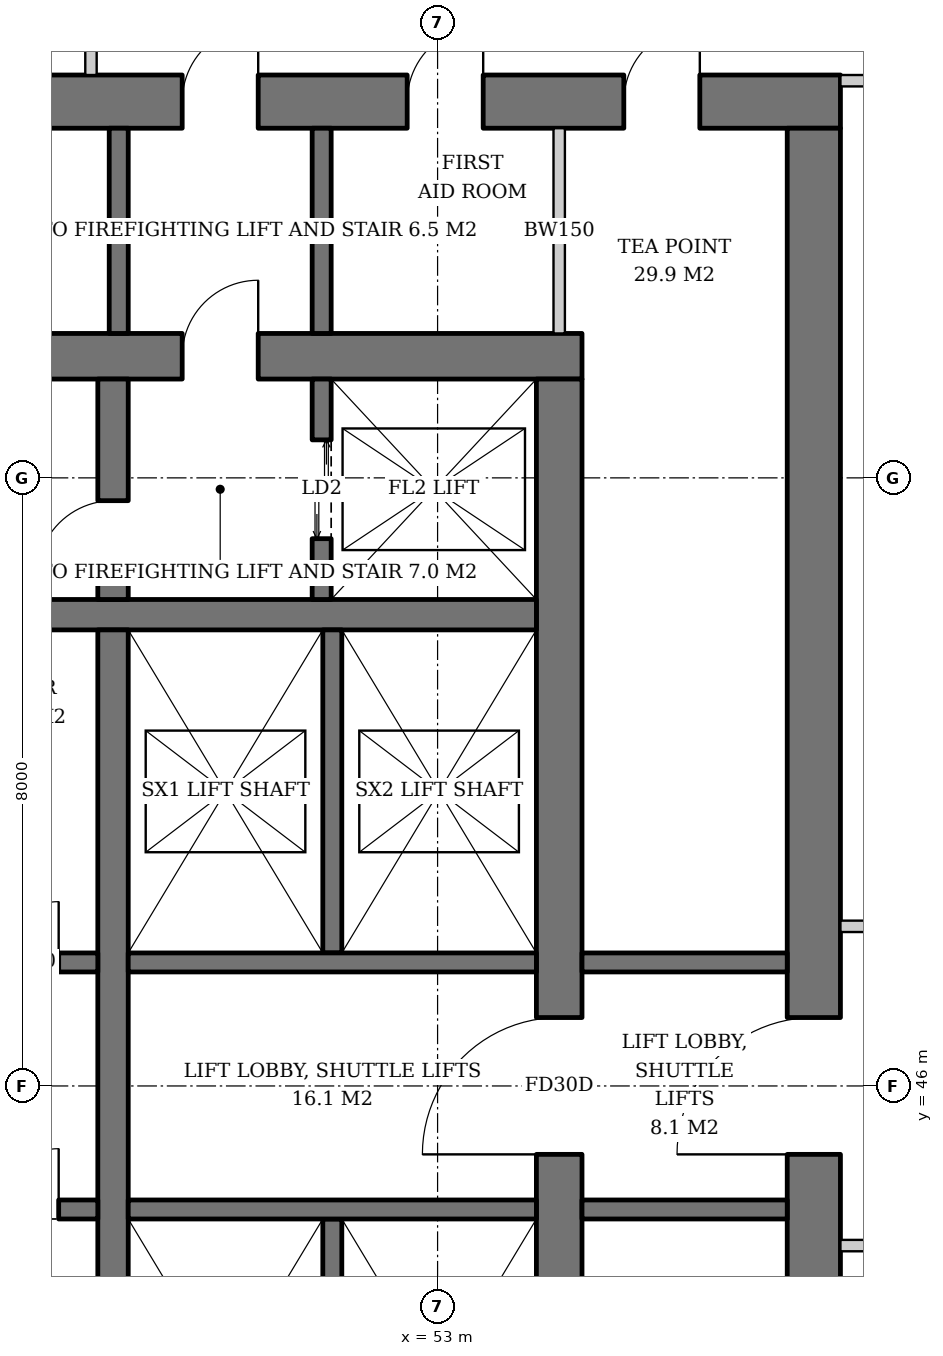
"""IFC4 building model, lengths in metres.
Left out: names, types, materials, properties, quantities, classifications, styles, units other than length and angle.
Written with IfcOpenShell. Run it as: python <this file> out.ifc"""

import sys

from ifc_helpers import new_model, si_unit, direction, frame, frame_2d, origin, place, context, subcontext, project, spatial, rectangle, extrude, element, fill, save


model = new_model("IFC4")
c1 = context("Model", 3, precision=1e-05, world=origin(), true_north=direction((0.0, 1.0)))
c2 = subcontext(c1, "Body", "Model", "MODEL_VIEW")
j1 = project(units=[si_unit("LENGTHUNIT", "METRE"), si_unit("PLANEANGLEUNIT", "RADIAN")], contexts=[c1])
p1 = place(None, origin())
s1 = spatial("IfcSite", under=j1, at=p1, CompositionType="ELEMENT")
p2 = place(p1, origin())
s2 = spatial("IfcBuilding", under=s1, at=p2, CompositionType="ELEMENT")
p3 = place(p2, frame((0.0, 0.0, 100.8)))
s3 = spatial("IfcBuildingStorey", under=s2, at=p3, CompositionType="ELEMENT", Elevation=100.8)
p4 = place(p3, frame((35.1, 55.6, 0.0), z_axis=(0.0, 0.0, 1.0), x_axis=(1.0, 0.0, 0.0)))
e1 = element("IfcWall", 1, at=p4, inside=s3, PredefinedType="SHEAR", context=c2, shape_type="SweptSolid", body=[
    extrude(rectangle(XDim=19.8, YDim=0.6, at=frame_2d((9.9, 0.0))), origin(), (0.0, 0.0, 1.0), 3.8),
])
p5 = place(p4, frame((14.54, 0.0, 0.0)))
e2 = element("IfcOpeningElement", 2, at=p5, cuts=e1, PredefinedType="OPENING", context=c2, shape_type="SweptSolid", body=[
    extrude(rectangle(XDim=1.0, YDim=2.1, at=frame_2d((0.5, 1.05))), frame((0.0, 0.31, 0.0), z_axis=(0.0, -1.0, 0.0), x_axis=(1.0, 0.0, 0.0)), (0.0, 0.0, 1.0), 0.62),
])
p6 = place(p4, frame((2.425, 0.0, 0.0)))
e3 = element("IfcOpeningElement", 3, at=p6, cuts=e1, PredefinedType="OPENING", context=c2, shape_type="SweptSolid", body=[
    extrude(rectangle(XDim=1.0, YDim=2.1, at=frame_2d((0.5, 1.05))), frame((0.0, 0.31, 0.0), z_axis=(0.0, -1.0, 0.0), x_axis=(1.0, 0.0, 0.0)), (0.0, 0.0, 1.0), 0.62),
])
p7 = place(p3, frame((54.6, 36.7, 0.0), z_axis=(0.0, 0.0, 1.0), x_axis=(0.0, 1.0, 0.0)))
e4 = element("IfcWall", 4, at=p7, inside=s3, PredefinedType="SHEAR", context=c2, shape_type="SweptSolid", body=[
    extrude(rectangle(XDim=18.6, YDim=0.6, at=frame_2d((9.3, 0.0))), origin(), (0.0, 0.0, 1.0), 3.8),
])
p8 = place(p7, frame((8.4, 0.0, 0.0)))
e5 = element("IfcOpeningElement", 5, at=p8, cuts=e4, PredefinedType="OPENING", context=c2, shape_type="SweptSolid", body=[
    extrude(rectangle(XDim=1.8, YDim=2.4, at=frame_2d((0.9, 1.2))), frame((0.0, 0.31, 0.0), z_axis=(0.0, -1.0, 0.0), x_axis=(1.0, 0.0, 0.0)), (0.0, 0.0, 1.0), 0.62),
])
p9 = place(p3, frame((31.7, 58.95, 0.0), z_axis=(0.0, 0.0, 1.0), x_axis=(1.0, 0.0, 0.0)))
e6 = element("IfcWall", 6, at=p9, inside=s3, PredefinedType="SHEAR", context=c2, shape_type="SweptSolid", body=[
    extrude(rectangle(XDim=26.6, YDim=0.7, at=frame_2d((13.3, 0.0))), origin(), (0.0, 0.0, 1.0), 3.8),
])
p10 = place(p9, frame((17.94, 0.0, 0.0)))
e7 = element("IfcOpeningElement", 7, at=p10, cuts=e6, PredefinedType="OPENING", context=c2, shape_type="SweptSolid", body=[
    extrude(rectangle(XDim=1.0, YDim=2.1, at=frame_2d((0.5, 1.05))), frame((0.0, 0.36, 0.0), z_axis=(0.0, -1.0, 0.0), x_axis=(1.0, 0.0, 0.0)), (0.0, 0.0, 1.0), 0.72),
])
p11 = place(p9, frame((5.825, 0.0, 0.0)))
e8 = element("IfcOpeningElement", 8, at=p11, cuts=e6, PredefinedType="OPENING", context=c2, shape_type="SweptSolid", body=[
    extrude(rectangle(XDim=1.0, YDim=2.1, at=frame_2d((0.5, 1.05))), frame((0.0, 0.36, 0.0), z_axis=(0.0, -1.0, 0.0), x_axis=(1.0, 0.0, 0.0)), (0.0, 0.0, 1.0), 0.72),
])
p12 = place(p9, frame((1.169, 0.0, 0.0)))
e9 = element("IfcOpeningElement", 9, at=p12, cuts=e6, PredefinedType="OPENING", context=c2, shape_type="SweptSolid", body=[
    extrude(rectangle(XDim=1.0, YDim=2.1, at=frame_2d((0.5, 1.05))), frame((0.0, 0.36, 0.0), z_axis=(0.0, -1.0, 0.0), x_axis=(1.0, 0.0, 0.0)), (0.0, 0.0, 1.0), 0.72),
])
p13 = place(p9, frame((3.447, 0.0, 0.0)))
e10 = element("IfcOpeningElement", 10, at=p13, cuts=e6, PredefinedType="OPENING", context=c2, shape_type="SweptSolid", body=[
    extrude(rectangle(XDim=1.0, YDim=2.1, at=frame_2d((0.5, 1.05))), frame((0.0, 0.36, 0.0), z_axis=(0.0, -1.0, 0.0), x_axis=(1.0, 0.0, 0.0)), (0.0, 0.0, 1.0), 0.72),
])
p14 = place(p9, frame((11.577, 0.0, 0.0)))
e11 = element("IfcOpeningElement", 11, at=p14, cuts=e6, PredefinedType="OPENING", context=c2, shape_type="SweptSolid", body=[
    extrude(rectangle(XDim=1.0, YDim=2.1, at=frame_2d((0.5, 1.05))), frame((0.0, 0.36, 0.0), z_axis=(0.0, -1.0, 0.0), x_axis=(1.0, 0.0, 0.0)), (0.0, 0.0, 1.0), 0.72),
])
p15 = place(p9, frame((20.9, 0.0, 0.0)))
e12 = element("IfcOpeningElement", 12, at=p15, cuts=e6, PredefinedType="OPENING", context=c2, shape_type="SweptSolid", body=[
    extrude(rectangle(XDim=1.0, YDim=2.1, at=frame_2d((0.5, 1.05))), frame((0.0, 0.36, 0.0), z_axis=(0.0, -1.0, 0.0), x_axis=(1.0, 0.0, 0.0)), (0.0, 0.0, 1.0), 0.72),
])
p16 = place(p9, frame((23.75, 0.0, 0.0)))
e13 = element("IfcOpeningElement", 13, at=p16, cuts=e6, PredefinedType="OPENING", context=c2, shape_type="SweptSolid", body=[
    extrude(rectangle(XDim=1.0, YDim=2.1, at=frame_2d((0.5, 1.05))), frame((0.0, 0.36, 0.0), z_axis=(0.0, -1.0, 0.0), x_axis=(1.0, 0.0, 0.0)), (0.0, 0.0, 1.0), 0.72),
])
p17 = place(p3, frame((57.95, 33.4, 0.0), z_axis=(0.0, 0.0, 1.0), x_axis=(0.0, 1.0, 0.0)))
e14 = element("IfcWall", 14, at=p17, inside=s3, PredefinedType="SHEAR", context=c2, shape_type="SweptSolid", body=[
    extrude(rectangle(XDim=25.2, YDim=0.7, at=frame_2d((12.6, 0.0))), origin(), (0.0, 0.0, 1.0), 3.8),
])
p18 = place(p17, frame((11.7, 0.0, 0.0)))
e15 = element("IfcOpeningElement", 15, at=p18, cuts=e14, PredefinedType="OPENING", context=c2, shape_type="SweptSolid", body=[
    extrude(rectangle(XDim=1.8, YDim=2.4, at=frame_2d((0.9, 1.2))), frame((0.0, 0.36, 0.0), z_axis=(0.0, -1.0, 0.0), x_axis=(1.0, 0.0, 0.0)), (0.0, 0.0, 1.0), 0.72),
])
p19 = place(p3, frame((35.7, 52.2, 0.0), z_axis=(0.0, 0.0, 1.0), x_axis=(1.0, 0.0, 0.0)))
e16 = element("IfcWall", 16, at=p19, inside=s3, PredefinedType="SHEAR", context=c2, shape_type="SweptSolid", body=[
    extrude(rectangle(XDim=18.6, YDim=0.4, at=frame_2d((9.3, 0.0))), origin(), (0.0, 0.0, 1.0), 3.8),
])
p20 = place(p3, frame((48.73, 40.0, 0.0), z_axis=(0.0, 0.0, 1.0), x_axis=(0.0, 1.0, 0.0)))
e17 = element("IfcWall", 17, at=p20, inside=s3, PredefinedType="SHEAR", context=c2, shape_type="SweptSolid", body=[
    extrude(rectangle(XDim=12.0, YDim=0.4, at=frame_2d((6.0, 0.0))), origin(), (0.0, 0.0, 1.0), 3.8),
])
p21 = place(p3, frame((48.73, 52.4, 0.0), z_axis=(0.0, 0.0, 1.0), x_axis=(0.0, 1.0, 0.0)))
e18 = element("IfcWall", 18, at=p21, inside=s3, PredefinedType="SHEAR", context=c2, shape_type="SweptSolid", body=[
    extrude(rectangle(XDim=2.9, YDim=0.4, at=frame_2d((1.45, 0.0))), origin(), (0.0, 0.0, 1.0), 3.8),
])
p22 = place(p21, frame((0.3, 0.0, 0.0)))
e19 = element("IfcOpeningElement", 19, at=p22, cuts=e18, PredefinedType="OPENING", context=c2, shape_type="SweptSolid", body=[
    extrude(rectangle(XDim=1.0, YDim=2.1, at=frame_2d((0.5, 1.05))), frame((0.0, 0.21, 0.0), z_axis=(0.0, -1.0, 0.0), x_axis=(1.0, 0.0, 0.0)), (0.0, 0.0, 1.0), 0.42),
])
p23 = place(p3, frame((51.475, 52.4, 0.0), z_axis=(0.0, 0.0, 1.0), x_axis=(0.0, 1.0, 0.0)))
e20 = element("IfcWall", 20, at=p23, inside=s3, PredefinedType="SHEAR", context=c2, shape_type="SweptSolid", body=[
    extrude(rectangle(XDim=2.9, YDim=0.25, at=frame_2d((1.45, 0.0))), origin(), (0.0, 0.0, 1.0), 3.8),
])
p24 = place(p23, frame((0.8, 0.0, 0.0)))
e21 = element("IfcOpeningElement", 21, at=p24, cuts=e20, PredefinedType="OPENING", context=c2, shape_type="SweptSolid", body=[
    extrude(rectangle(XDim=1.3, YDim=2.2, at=frame_2d((0.65, 1.1))), frame((0.0, 0.135, 0.0), z_axis=(0.0, -1.0, 0.0), x_axis=(1.0, 0.0, 0.0)), (0.0, 0.0, 1.0), 0.27),
])
p25 = place(p3, frame((35.7, 47.625, 0.0), z_axis=(0.0, 0.0, 1.0), x_axis=(1.0, 0.0, 0.0)))
e22 = element("IfcWall", 22, at=p25, inside=s3, PredefinedType="SHEAR", context=c2, shape_type="SweptSolid", body=[
    extrude(rectangle(XDim=12.83, YDim=0.25, at=frame_2d((6.415, 0.0))), origin(), (0.0, 0.0, 1.0), 3.8),
])
p26 = place(p25, frame((0.7, 0.0, 0.0)))
e23 = element("IfcOpeningElement", 23, at=p26, cuts=e22, PredefinedType="OPENING", context=c2, shape_type="SweptSolid", body=[
    extrude(rectangle(XDim=1.1, YDim=2.2, at=frame_2d((0.55, 1.1))), frame((0.0, 0.135, 0.0), z_axis=(0.0, -1.0, 0.0), x_axis=(1.0, 0.0, 0.0)), (0.0, 0.0, 1.0), 0.27),
])
p27 = place(p25, frame((3.45, 0.0, 0.0)))
e24 = element("IfcOpeningElement", 24, at=p27, cuts=e22, PredefinedType="OPENING", context=c2, shape_type="SweptSolid", body=[
    extrude(rectangle(XDim=1.1, YDim=2.2, at=frame_2d((0.55, 1.1))), frame((0.0, 0.135, 0.0), z_axis=(0.0, -1.0, 0.0), x_axis=(1.0, 0.0, 0.0)), (0.0, 0.0, 1.0), 0.27),
])
p28 = place(p25, frame((6.2, 0.0, 0.0)))
e25 = element("IfcOpeningElement", 25, at=p28, cuts=e22, PredefinedType="OPENING", context=c2, shape_type="SweptSolid", body=[
    extrude(rectangle(XDim=1.1, YDim=2.2, at=frame_2d((0.55, 1.1))), frame((0.0, 0.135, 0.0), z_axis=(0.0, -1.0, 0.0), x_axis=(1.0, 0.0, 0.0)), (0.0, 0.0, 1.0), 0.27),
])
p29 = place(p25, frame((8.95, 0.0, 0.0)))
e26 = element("IfcOpeningElement", 26, at=p29, cuts=e22, PredefinedType="OPENING", context=c2, shape_type="SweptSolid", body=[
    extrude(rectangle(XDim=1.1, YDim=2.2, at=frame_2d((0.55, 1.1))), frame((0.0, 0.135, 0.0), z_axis=(0.0, -1.0, 0.0), x_axis=(1.0, 0.0, 0.0)), (0.0, 0.0, 1.0), 0.27),
])
p30 = place(p25, frame((11.515, 0.0, 0.0)))
e27 = element("IfcOpeningElement", 27, at=p30, cuts=e22, PredefinedType="OPENING", context=c2, shape_type="SweptSolid", body=[
    extrude(rectangle(XDim=0.8, YDim=2.0, at=frame_2d((0.4, 1.0))), frame((0.0, 0.135, 0.0), z_axis=(0.0, -1.0, 0.0), x_axis=(1.0, 0.0, 0.0)), (0.0, 0.0, 1.0), 0.27),
])
p31 = place(p3, frame((35.7, 44.375, 0.0), z_axis=(0.0, 0.0, 1.0), x_axis=(1.0, 0.0, 0.0)))
e28 = element("IfcWall", 28, at=p31, inside=s3, PredefinedType="SHEAR", context=c2, shape_type="SweptSolid", body=[
    extrude(rectangle(XDim=12.83, YDim=0.25, at=frame_2d((6.415, 0.0))), origin(), (0.0, 0.0, 1.0), 3.8),
])
p32 = place(p31, frame((0.7, 0.0, 0.0)))
e29 = element("IfcOpeningElement", 29, at=p32, cuts=e28, PredefinedType="OPENING", context=c2, shape_type="SweptSolid", body=[
    extrude(rectangle(XDim=1.1, YDim=2.2, at=frame_2d((0.55, 1.1))), frame((0.0, 0.135, 0.0), z_axis=(0.0, -1.0, 0.0), x_axis=(1.0, 0.0, 0.0)), (0.0, 0.0, 1.0), 0.27),
])
p33 = place(p31, frame((3.45, 0.0, 0.0)))
e30 = element("IfcOpeningElement", 30, at=p33, cuts=e28, PredefinedType="OPENING", context=c2, shape_type="SweptSolid", body=[
    extrude(rectangle(XDim=1.1, YDim=2.2, at=frame_2d((0.55, 1.1))), frame((0.0, 0.135, 0.0), z_axis=(0.0, -1.0, 0.0), x_axis=(1.0, 0.0, 0.0)), (0.0, 0.0, 1.0), 0.27),
])
p34 = place(p31, frame((6.2, 0.0, 0.0)))
e31 = element("IfcOpeningElement", 31, at=p34, cuts=e28, PredefinedType="OPENING", context=c2, shape_type="SweptSolid", body=[
    extrude(rectangle(XDim=1.1, YDim=2.2, at=frame_2d((0.55, 1.1))), frame((0.0, 0.135, 0.0), z_axis=(0.0, -1.0, 0.0), x_axis=(1.0, 0.0, 0.0)), (0.0, 0.0, 1.0), 0.27),
])
p35 = place(p31, frame((8.95, 0.0, 0.0)))
e32 = element("IfcOpeningElement", 32, at=p35, cuts=e28, PredefinedType="OPENING", context=c2, shape_type="SweptSolid", body=[
    extrude(rectangle(XDim=1.1, YDim=2.2, at=frame_2d((0.55, 1.1))), frame((0.0, 0.135, 0.0), z_axis=(0.0, -1.0, 0.0), x_axis=(1.0, 0.0, 0.0)), (0.0, 0.0, 1.0), 0.27),
])
p36 = place(p31, frame((11.515, 0.0, 0.0)))
e33 = element("IfcOpeningElement", 33, at=p36, cuts=e28, PredefinedType="OPENING", context=c2, shape_type="SweptSolid", body=[
    extrude(rectangle(XDim=0.8, YDim=2.0, at=frame_2d((0.4, 1.0))), frame((0.0, 0.135, 0.0), z_axis=(0.0, -1.0, 0.0), x_axis=(1.0, 0.0, 0.0)), (0.0, 0.0, 1.0), 0.27),
])
p37 = place(p3, frame((51.615, 47.75, 0.0), z_axis=(0.0, 0.0, 1.0), x_axis=(0.0, 1.0, 0.0)))
e34 = element("IfcWall", 34, at=p37, inside=s3, PredefinedType="SHEAR", context=c2, shape_type="SweptSolid", body=[
    extrude(rectangle(XDim=4.25, YDim=0.25, at=frame_2d((2.125, 0.0))), origin(), (0.0, 0.0, 1.0), 3.8),
])
p38 = place(p3, frame((48.93, 47.625, 0.0), z_axis=(0.0, 0.0, 1.0), x_axis=(1.0, 0.0, 0.0)))
e35 = element("IfcWall", 35, at=p38, inside=s3, PredefinedType="SHEAR", context=c2, shape_type="SweptSolid", body=[
    extrude(rectangle(XDim=5.37, YDim=0.25, at=frame_2d((2.685, 0.0))), origin(), (0.0, 0.0, 1.0), 3.8),
])
p39 = place(p3, frame((51.615, 44.25, 0.0), z_axis=(0.0, 0.0, 1.0), x_axis=(0.0, -1.0, 0.0)))
e36 = element("IfcWall", 36, at=p39, inside=s3, PredefinedType="SHEAR", context=c2, shape_type="SweptSolid", body=[
    extrude(rectangle(XDim=4.25, YDim=0.25, at=frame_2d((2.125, 0.0))), origin(), (0.0, 0.0, 1.0), 3.8),
])
p40 = place(p3, frame((48.93, 44.375, 0.0), z_axis=(0.0, 0.0, 1.0), x_axis=(1.0, 0.0, 0.0)))
e37 = element("IfcWall", 37, at=p40, inside=s3, PredefinedType="SHEAR", context=c2, shape_type="SweptSolid", body=[
    extrude(rectangle(XDim=5.37, YDim=0.25, at=frame_2d((2.685, 0.0))), origin(), (0.0, 0.0, 1.0), 3.8),
])
for number, where, z_axis, x_axis in (
    (38, (48.805, 55.9, 0.0), (0.0, 0.0, 1.0), (0.0, 1.0, 0.0)),
    (39, (51.475, 55.9, 0.0), (0.0, 0.0, 1.0), (0.0, 1.0, 0.0)),
    (40, (54.9, 44.375, 0.0), (0.0, 0.0, 1.0), (1.0, 0.0, 0.0)),
    (41, (54.9, 47.625, 0.0), (0.0, 0.0, 1.0), (1.0, 0.0, 0.0)),
):
    element("IfcWall", number, at=place(p3, frame(where, z_axis=z_axis, x_axis=x_axis)), inside=s3, PredefinedType="SOLIDWALL", context=c2, shape_type="SweptSolid", body=[
        extrude(rectangle(XDim=2.7, YDim=0.25, at=frame_2d((1.35, 0.0))), origin(), (0.0, 0.0, 1.0), 3.62),
    ])
p41 = place(p3, frame((54.6, 55.9, 0.0), z_axis=(0.0, 0.0, 1.0), x_axis=(0.0, 1.0, 0.0)))
e42 = element("IfcWall", 42, at=p41, inside=s3, PredefinedType="SOLIDWALL", context=c2, shape_type="SweptSolid", body=[
    extrude(rectangle(XDim=2.7, YDim=0.15, at=frame_2d((1.35, 0.0))), origin(), (0.0, 0.0, 1.0), 3.62),
])
for number, where, z_axis, x_axis in (
    (43, (58.3, 43.9, 0.0), (0.0, 0.0, 1.0), (1.0, 0.0, 0.0)),
    (44, (58.3, 48.1, 0.0), (0.0, 0.0, 1.0), (1.0, 0.0, 0.0)),
    (45, (58.3, 59.225, 0.0), (0.0, 0.0, 1.0), (1.0, 0.0, 0.0)),
    (46, (48.44, 59.3, 0.0), (0.0, 0.0, 1.0), (0.0, 1.0, 0.0)),
):
    element("IfcWall", number, at=place(p3, frame(where, z_axis=z_axis, x_axis=x_axis)), inside=s3, PredefinedType="PARTITIONING", context=c2, shape_type="SweptSolid", body=[
        extrude(rectangle(XDim=2.925, YDim=0.15, at=frame_2d((1.462, 0.0))), origin(), (0.0, 0.0, 1.0), 3.62),
    ])
p42 = place(p24, origin())
e47 = element("IfcDoor", 47, at=p42, inside=s3, OperationType="DOUBLE_DOOR_SLIDING", PredefinedType="DOOR", context=c2, shape_type="SweptSolid", body=[
    extrude(rectangle(XDim=1.3, YDim=2.2, at=frame_2d((0.65, 1.1))), frame((0.0, 0.025, 0.0), z_axis=(0.0, -1.0, 0.0), x_axis=(1.0, 0.0, 0.0)), (0.0, 0.0, 1.0), 0.05),
])
fill(e21, e47)
p43 = place(p30, origin())
e48 = element("IfcDoor", 48, at=p43, inside=s3, OperationType="SINGLE_SWING_RIGHT", PredefinedType="DOOR", context=c2, shape_type="SweptSolid", body=[
    extrude(rectangle(XDim=0.8, YDim=2.0, at=frame_2d((0.4, 1.0))), frame((0.0, 0.025, 0.0), z_axis=(0.0, -1.0, 0.0), x_axis=(1.0, 0.0, 0.0)), (0.0, 0.0, 1.0), 0.05),
])
fill(e27, e48)
p44 = place(p36, origin())
e49 = element("IfcDoor", 49, at=p44, inside=s3, OperationType="SINGLE_SWING_RIGHT", PredefinedType="DOOR", context=c2, shape_type="SweptSolid", body=[
    extrude(rectangle(XDim=0.8, YDim=2.0, at=frame_2d((0.4, 1.0))), frame((0.0, 0.025, 0.0), z_axis=(0.0, -1.0, 0.0), x_axis=(1.0, 0.0, 0.0)), (0.0, 0.0, 1.0), 0.05),
])
fill(e33, e49)
p45 = place(p22, origin())
e50 = element("IfcDoor", 50, at=p45, inside=s3, OperationType="SINGLE_SWING_LEFT", PredefinedType="DOOR", context=c2, shape_type="SweptSolid", body=[
    extrude(rectangle(XDim=1.0, YDim=2.1, at=frame_2d((0.5, 1.05))), frame((0.0, 0.025, 0.0), z_axis=(0.0, -1.0, 0.0), x_axis=(1.0, 0.0, 0.0)), (0.0, 0.0, 1.0), 0.05),
])
fill(e19, e50)
p46 = place(p5, origin())
e51 = element("IfcDoor", 51, at=p46, inside=s3, OperationType="SINGLE_SWING_RIGHT", PredefinedType="DOOR", context=c2, shape_type="SweptSolid", body=[
    extrude(rectangle(XDim=1.0, YDim=2.1, at=frame_2d((0.5, 1.05))), frame((0.0, 0.025, 0.0), z_axis=(0.0, -1.0, 0.0), x_axis=(1.0, 0.0, 0.0)), (0.0, 0.0, 1.0), 0.05),
])
fill(e2, e51)
p47 = place(p8, origin())
e52 = element("IfcDoor", 52, at=p47, inside=s3, OperationType="DOUBLE_DOOR_SINGLE_SWING", PredefinedType="DOOR", context=c2, shape_type="SweptSolid", body=[
    extrude(rectangle(XDim=1.8, YDim=2.4, at=frame_2d((0.9, 1.2))), frame((0.0, 0.025, 0.0), z_axis=(0.0, -1.0, 0.0), x_axis=(1.0, 0.0, 0.0)), (0.0, 0.0, 1.0), 0.05),
])
fill(e5, e52)
p48 = place(p18, origin())
e53 = element("IfcDoor", 53, at=p48, inside=s3, OperationType="DOUBLE_DOOR_SINGLE_SWING", PredefinedType="DOOR", context=c2, shape_type="SweptSolid", body=[
    extrude(rectangle(XDim=1.8, YDim=2.4, at=frame_2d((0.9, 1.2))), frame((0.0, 0.025, 0.0), z_axis=(0.0, -1.0, 0.0), x_axis=(1.0, 0.0, 0.0)), (0.0, 0.0, 1.0), 0.05),
])
fill(e15, e53)
p49 = place(p10, origin())
e54 = element("IfcDoor", 54, at=p49, inside=s3, OperationType="SINGLE_SWING_RIGHT", PredefinedType="DOOR", context=c2, shape_type="SweptSolid", body=[
    extrude(rectangle(XDim=1.0, YDim=2.1, at=frame_2d((0.5, 1.05))), frame((0.0, 0.025, 0.0), z_axis=(0.0, -1.0, 0.0), x_axis=(1.0, 0.0, 0.0)), (0.0, 0.0, 1.0), 0.05),
])
fill(e7, e54)
p50 = place(p15, origin())
e55 = element("IfcDoor", 55, at=p50, inside=s3, OperationType="SINGLE_SWING_RIGHT", PredefinedType="DOOR", context=c2, shape_type="SweptSolid", body=[
    extrude(rectangle(XDim=1.0, YDim=2.1, at=frame_2d((0.5, 1.05))), frame((0.0, -0.29, 0.0), z_axis=(0.0, -1.0, 0.0), x_axis=(1.0, 0.0, 0.0)), (0.0, 0.0, 1.0), 0.05),
])
fill(e12, e55)
p51 = place(p16, origin())
e56 = element("IfcDoor", 56, at=p51, inside=s3, OperationType="SINGLE_SWING_RIGHT", PredefinedType="DOOR", context=c2, shape_type="SweptSolid", body=[
    extrude(rectangle(XDim=1.0, YDim=2.1, at=frame_2d((0.5, 1.05))), frame((0.0, -0.29, 0.0), z_axis=(0.0, -1.0, 0.0), x_axis=(1.0, 0.0, 0.0)), (0.0, 0.0, 1.0), 0.05),
])
fill(e13, e56)
save(model, sys.argv[1])
